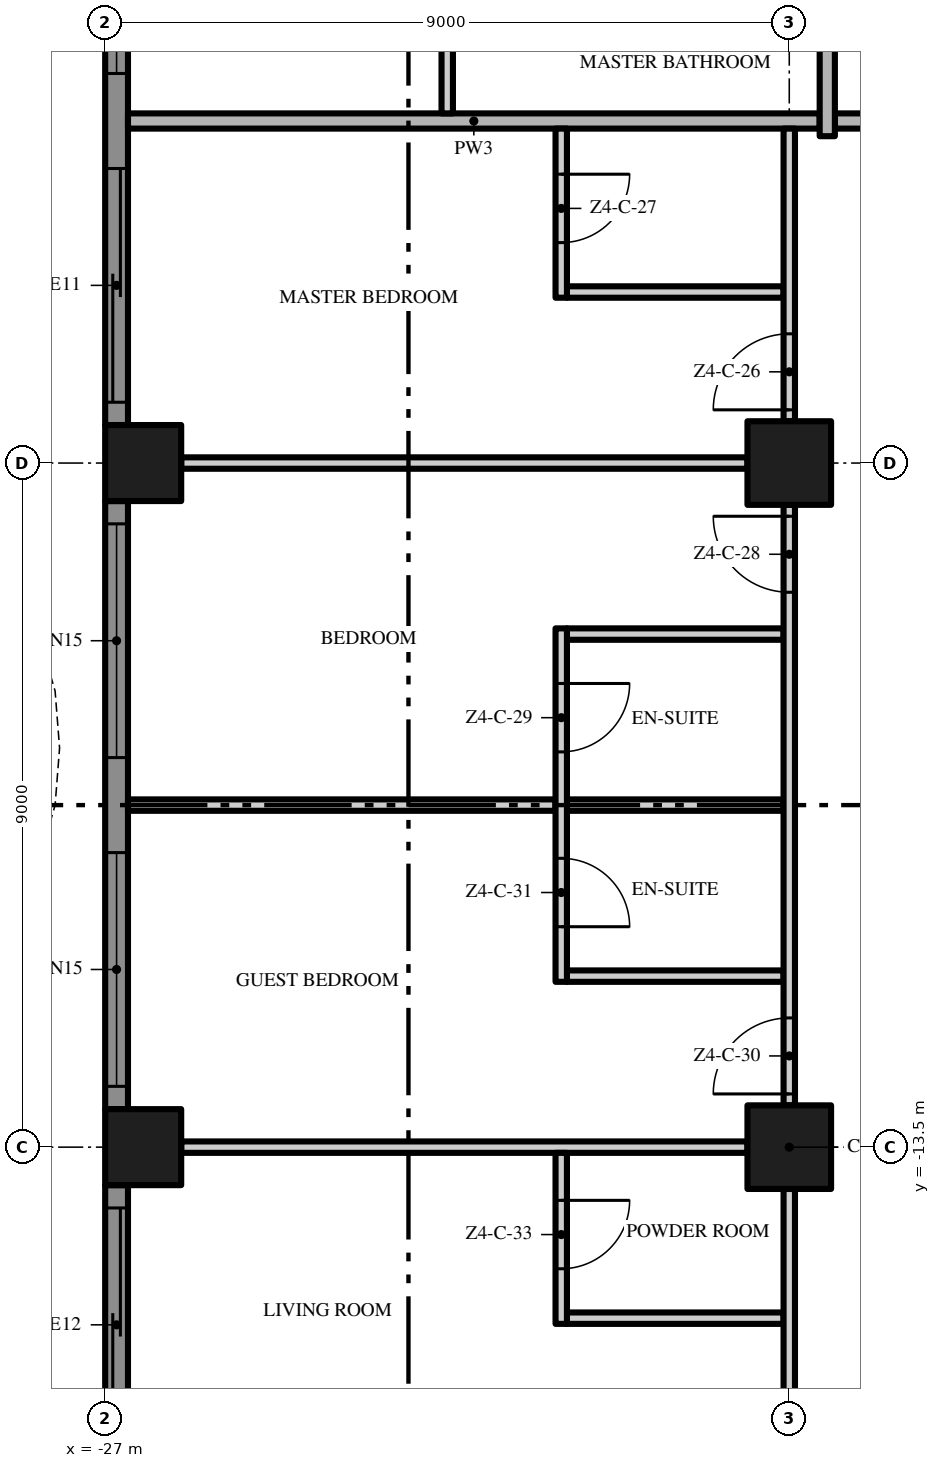
"""IFC4 building model, lengths in metres.
Left out: names, types, materials, properties, quantities, classifications, styles, units other than length and angle.
Written with IfcOpenShell. Run it as: python <this file> out.ifc"""

import sys

from ifc_helpers import new_model, si_unit, direction, frame, frame_2d, origin, origin_2d, place, context, subcontext, project, spatial, polyline, rectangle, outline, extrude, element, fill, save


model = new_model("IFC4")
c1 = context("Model", 3, precision=1e-05, world=origin(), true_north=direction((0.0, 1.0)))
c2 = subcontext(c1, "Body", "Model", "MODEL_VIEW")
j1 = project(units=[si_unit("LENGTHUNIT", "METRE"), si_unit("PLANEANGLEUNIT", "RADIAN")], contexts=[c1])
p1 = place(None, origin())
s1 = spatial("IfcSite", under=j1, at=p1, CompositionType="ELEMENT")
p2 = place(p1, origin())
s2 = spatial("IfcBuilding", under=s1, at=p2, CompositionType="ELEMENT")
p3 = place(p2, frame((0.0, 0.0, 211.0)))
s3 = spatial("IfcBuildingStorey", under=s2, at=p3, CompositionType="ELEMENT", Elevation=211.0)
for number, where, z_axis, x_axis in (
    (1, (-18.0, -13.5, 0.0), (0.0, 0.0, 1.0), (1.0, 0.0, 0.0)),
    (2, (-18.0, -4.5, 0.0), (0.0, 0.0, 1.0), (1.0, 0.0, 0.0)),
):
    element("IfcColumn", number, at=place(p3, frame(where, z_axis=z_axis, x_axis=x_axis)), inside=s3, PredefinedType="COLUMN", context=c2, shape_type="SweptSolid", body=[
        extrude(rectangle(XDim=1.1, YDim=1.1, at=origin_2d()), origin(), (0.0, 0.0, 1.0), 3.5),
    ])
for number, where, z_axis, x_axis in (
    (3, (-26.5, -13.5, 0.0), (0.0, 0.0, 1.0), (1.0, 0.0, 0.0)),
    (4, (-26.5, -4.5, 0.0), (0.0, 0.0, 1.0), (1.0, 0.0, 0.0)),
):
    element("IfcColumn", number, at=place(p3, frame(where, z_axis=z_axis, x_axis=x_axis)), inside=s3, PredefinedType="COLUMN", context=c2, shape_type="SweptSolid", body=[
        extrude(rectangle(XDim=1.0, YDim=1.0, at=origin_2d()), origin(), (0.0, 0.0, 1.0), 3.5),
    ])
p4 = place(p3, frame((-26.85, -4.0, 0.0), z_axis=(0.0, 0.0, 1.0), x_axis=(0.0, 1.0, 0.0)))
e5 = element("IfcWall", 5, at=p4, inside=s3, PredefinedType="SOLIDWALL", context=c2, shape_type="SweptSolid", body=[
    extrude(rectangle(XDim=8.0, YDim=0.3, at=frame_2d((4.0, 0.0))), origin(), (0.0, 0.0, 1.0), 3.5),
])
p5 = place(p4, frame((4.625, 0.0, 0.45)))
e6 = element("IfcOpeningElement", 6, at=p5, cuts=e5, PredefinedType="OPENING", context=c2, shape_type="SweptSolid", body=[
    extrude(rectangle(XDim=3.075, YDim=2.65, at=frame_2d((1.538, 1.325))), frame((0.0, 0.16, 0.0), z_axis=(0.0, -1.0, 0.0), x_axis=(1.0, 0.0, 0.0)), (0.0, 0.0, 1.0), 0.32),
])
p6 = place(p4, frame((0.3, 0.0, 0.0)))
e7 = element("IfcOpeningElement", 7, at=p6, cuts=e5, PredefinedType="OPENING", context=c2, shape_type="SweptSolid", body=[
    extrude(rectangle(XDim=3.075, YDim=2.4, at=frame_2d((1.538, 1.2))), frame((0.0, 0.16, 0.0), z_axis=(0.0, -1.0, 0.0), x_axis=(1.0, 0.0, 0.0)), (0.0, 0.0, 1.0), 0.32),
])
p7 = place(p3, frame((-26.85, -13.0, 0.0), z_axis=(0.0, 0.0, 1.0), x_axis=(0.0, 1.0, 0.0)))
e8 = element("IfcWall", 8, at=p7, inside=s3, PredefinedType="SOLIDWALL", context=c2, shape_type="SweptSolid", body=[
    extrude(rectangle(XDim=8.0, YDim=0.3, at=frame_2d((4.0, 0.0))), origin(), (0.0, 0.0, 1.0), 3.5),
])
p8 = place(p7, frame((4.625, 0.0, 0.45)))
e9 = element("IfcOpeningElement", 9, at=p8, cuts=e8, PredefinedType="OPENING", context=c2, shape_type="SweptSolid", body=[
    extrude(rectangle(XDim=3.075, YDim=2.65, at=frame_2d((1.538, 1.325))), frame((0.0, 0.16, 0.0), z_axis=(0.0, -1.0, 0.0), x_axis=(1.0, 0.0, 0.0)), (0.0, 0.0, 1.0), 0.32),
])
p9 = place(p7, frame((0.3, 0.0, 0.45)))
e10 = element("IfcOpeningElement", 10, at=p9, cuts=e8, PredefinedType="OPENING", context=c2, shape_type="SweptSolid", body=[
    extrude(rectangle(XDim=3.075, YDim=2.65, at=frame_2d((1.538, 1.325))), frame((0.0, 0.16, 0.0), z_axis=(0.0, -1.0, 0.0), x_axis=(1.0, 0.0, 0.0)), (0.0, 0.0, 1.0), 0.32),
])
p10 = place(p3, frame((-26.85, -18.0, 0.0), z_axis=(0.0, 0.0, 1.0), x_axis=(0.0, 1.0, 0.0)))
e11 = element("IfcWall", 11, at=p10, inside=s3, PredefinedType="SOLIDWALL", context=c2, shape_type="SweptSolid", body=[
    extrude(rectangle(XDim=4.0, YDim=0.3, at=frame_2d((2.0, 0.0))), origin(), (0.0, 0.0, 1.0), 3.5),
])
p11 = place(p10, frame((0.625, 0.0, 0.0)))
e12 = element("IfcOpeningElement", 12, at=p11, cuts=e11, PredefinedType="OPENING", context=c2, shape_type="SweptSolid", body=[
    extrude(rectangle(XDim=3.075, YDim=2.4, at=frame_2d((1.538, 1.2))), frame((0.0, 0.16, 0.0), z_axis=(0.0, -1.0, 0.0), x_axis=(1.0, 0.0, 0.0)), (0.0, 0.0, 1.0), 0.32),
])
p12 = place(p3, origin())
e13 = element("IfcWall", 13, at=p12, inside=s3, PredefinedType="USERDEFINED", context=c2, shape_type="SweptSolid", body=[
    extrude(outline(polyline([(-28.8, 18.0), (-29.505, 16.5), (-29.941, 15.0), (-30.0, 14.25), (-29.941, 13.5), (-29.505, 12.0), (-28.8, 10.5), (-28.095, 9.0), (-27.659, 7.5), (-27.6, 6.75), (-27.659, 6.0), (-28.095, 4.5), (-28.8, 3.0), (-29.505, 1.5), (-29.941, 0.0), (-30.0, -0.75), (-29.941, -1.5), (-29.505, -3.0), (-28.8, -4.5), (-28.095, -6.0), (-27.659, -7.5), (-27.6, -8.25), (-27.659, -9.0), (-28.095, -10.5), (-28.8, -12.0), (-29.505, -13.5), (-29.941, -15.0), (-30.0, -15.75), (-29.941, -16.5), (-29.505, -18.0), (-29.265, -17.93), (-29.694, -16.455), (-29.749, -15.75), (-29.694, -15.045), (-29.271, -13.589), (-28.574, -12.106), (-27.86, -10.589), (-27.411, -9.045), (-27.349, -8.25), (-27.411, -7.455), (-27.86, -5.911), (-28.574, -4.394), (-29.271, -2.911), (-29.694, -1.455), (-29.749, -0.75), (-29.694, -0.045), (-29.271, 1.411), (-28.574, 2.894), (-27.86, 4.411), (-27.411, 5.955), (-27.349, 6.75), (-27.411, 7.545), (-27.86, 9.089), (-28.574, 10.606), (-29.271, 12.089), (-29.694, 13.545), (-29.749, 14.25), (-29.694, 14.955), (-29.271, 16.411), (-28.574, 17.894), (-28.8, 18.0)])), origin(), (0.0, 0.0, 1.0), 0.9),
])
p13 = place(p3, frame((-20.925, -15.75, 0.0), z_axis=(0.0, 0.0, 1.0), x_axis=(1.0, 0.0, 0.0)))
e14 = element("IfcWall", 14, at=p13, inside=s3, PredefinedType="PARTITIONING", context=c2, shape_type="SweptSolid", body=[
    extrude(rectangle(XDim=2.85, YDim=0.15, at=frame_2d((1.425, 0.0))), origin(), (0.0, 0.0, 1.0), 3.5),
])
p14 = place(p3, frame((-26.0, -13.5, 0.0), z_axis=(0.0, 0.0, 1.0), x_axis=(1.0, 0.0, 0.0)))
e15 = element("IfcWall", 15, at=p14, inside=s3, PredefinedType="PARTITIONING", context=c2, shape_type="SweptSolid", body=[
    extrude(rectangle(XDim=7.45, YDim=0.15, at=frame_2d((3.725, 0.0))), origin(), (0.0, 0.0, 1.0), 3.5),
])
p15 = place(p3, frame((-20.925, -11.25, 0.0), z_axis=(0.0, 0.0, 1.0), x_axis=(1.0, 0.0, 0.0)))
e16 = element("IfcWall", 16, at=p15, inside=s3, PredefinedType="PARTITIONING", context=c2, shape_type="SweptSolid", body=[
    extrude(rectangle(XDim=2.85, YDim=0.15, at=frame_2d((1.425, 0.0))), origin(), (0.0, 0.0, 1.0), 3.5),
])
p16 = place(p3, frame((-26.7, -9.0, 0.0), z_axis=(0.0, 0.0, 1.0), x_axis=(1.0, 0.0, 0.0)))
e17 = element("IfcWall", 17, at=p16, inside=s3, PredefinedType="PARTITIONING", context=c2, shape_type="SweptSolid", body=[
    extrude(rectangle(XDim=5.625, YDim=0.15, at=frame_2d((2.812, 0.0))), origin(), (0.0, 0.0, 1.0), 3.5),
])
for number, where, z_axis, x_axis in (
    (18, (-20.925, -9.0, 0.0), (0.0, 0.0, 1.0), (1.0, 0.0, 0.0)),
    (19, (-20.925, -6.75, 0.0), (0.0, 0.0, 1.0), (1.0, 0.0, 0.0)),
):
    element("IfcWall", number, at=place(p3, frame(where, z_axis=z_axis, x_axis=x_axis)), inside=s3, PredefinedType="PARTITIONING", context=c2, shape_type="SweptSolid", body=[
        extrude(rectangle(XDim=2.85, YDim=0.15, at=frame_2d((1.425, 0.0))), origin(), (0.0, 0.0, 1.0), 3.5),
    ])
p17 = place(p3, frame((-26.0, -4.5, 0.0), z_axis=(0.0, 0.0, 1.0), x_axis=(1.0, 0.0, 0.0)))
e20 = element("IfcWall", 20, at=p17, inside=s3, PredefinedType="PARTITIONING", context=c2, shape_type="SweptSolid", body=[
    extrude(rectangle(XDim=7.45, YDim=0.15, at=frame_2d((3.725, 0.0))), origin(), (0.0, 0.0, 1.0), 3.5),
])
p18 = place(p3, frame((-20.925, -2.25, 0.0), z_axis=(0.0, 0.0, 1.0), x_axis=(1.0, 0.0, 0.0)))
e21 = element("IfcWall", 21, at=p18, inside=s3, PredefinedType="PARTITIONING", context=c2, shape_type="SweptSolid", body=[
    extrude(rectangle(XDim=2.85, YDim=0.15, at=frame_2d((1.425, 0.0))), origin(), (0.0, 0.0, 1.0), 3.5),
])
p19 = place(p3, frame((-17.4, 0.0, 0.0), z_axis=(0.0, 0.0, 1.0), x_axis=(1.0, 0.0, 0.0)))
e22 = element("IfcWall", 22, at=p19, inside=s3, PredefinedType="PARTITIONING", context=c2, shape_type="SweptSolid", body=[
    extrude(rectangle(XDim=12.8, YDim=0.2, at=frame_2d((6.4, 0.0))), origin(), (0.0, 0.0, 1.0), 3.5),
])
p20 = place(p3, frame((-26.7, 0.0, 0.0), z_axis=(0.0, 0.0, 1.0), x_axis=(1.0, 0.0, 0.0)))
e23 = element("IfcWall", 23, at=p20, inside=s3, PredefinedType="PARTITIONING", context=c2, shape_type="SweptSolid", body=[
    extrude(rectangle(XDim=9.1, YDim=0.2, at=frame_2d((4.55, 0.0))), origin(), (0.0, 0.0, 1.0), 3.5),
])
p21 = place(p3, frame((-22.5, 0.1, 0.0), z_axis=(0.0, 0.0, 1.0), x_axis=(0.0, 1.0, 0.0)))
e24 = element("IfcWall", 24, at=p21, inside=s3, PredefinedType="PARTITIONING", context=c2, shape_type="SweptSolid", body=[
    extrude(rectangle(XDim=17.4, YDim=0.15, at=frame_2d((8.7, 0.0))), origin(), (0.0, 0.0, 1.0), 3.5),
])
p22 = place(p21, frame((1.65, 0.0, 0.0)))
e25 = element("IfcOpeningElement", 25, at=p22, cuts=e24, PredefinedType="OPENING", context=c2, shape_type="SweptSolid", body=[
    extrude(rectangle(XDim=1.0, YDim=2.4, at=frame_2d((0.5, 1.2))), frame((0.0, 0.085, 0.0), z_axis=(0.0, -1.0, 0.0), x_axis=(1.0, 0.0, 0.0)), (0.0, 0.0, 1.0), 0.17),
])
p23 = place(p21, frame((7.25, 0.0, 0.0)))
e26 = element("IfcOpeningElement", 26, at=p23, cuts=e24, PredefinedType="OPENING", context=c2, shape_type="SweptSolid", body=[
    extrude(rectangle(XDim=1.0, YDim=2.4, at=frame_2d((0.5, 1.2))), frame((0.0, 0.085, 0.0), z_axis=(0.0, -1.0, 0.0), x_axis=(1.0, 0.0, 0.0)), (0.0, 0.0, 1.0), 0.17),
])
p24 = place(p21, frame((9.5, 0.0, 0.0)))
e27 = element("IfcOpeningElement", 27, at=p24, cuts=e24, PredefinedType="OPENING", context=c2, shape_type="SweptSolid", body=[
    extrude(rectangle(XDim=1.0, YDim=2.4, at=frame_2d((0.5, 1.2))), frame((0.0, 0.085, 0.0), z_axis=(0.0, -1.0, 0.0), x_axis=(1.0, 0.0, 0.0)), (0.0, 0.0, 1.0), 0.17),
])
p25 = place(p21, frame((16.25, 0.0, 0.0)))
e28 = element("IfcOpeningElement", 28, at=p25, cuts=e24, PredefinedType="OPENING", context=c2, shape_type="SweptSolid", body=[
    extrude(rectangle(XDim=1.0, YDim=2.4, at=frame_2d((0.5, 1.2))), frame((0.0, 0.085, 0.0), z_axis=(0.0, -1.0, 0.0), x_axis=(1.0, 0.0, 0.0)), (0.0, 0.0, 1.0), 0.17),
])
p26 = place(p3, frame((-21.0, -13.575, 0.0), z_axis=(0.0, 0.0, 1.0), x_axis=(0.0, -1.0, 0.0)))
e29 = element("IfcWall", 29, at=p26, inside=s3, PredefinedType="PARTITIONING", context=c2, shape_type="SweptSolid", body=[
    extrude(rectangle(XDim=2.25, YDim=0.15, at=frame_2d((1.125, 0.0))), origin(), (0.0, 0.0, 1.0), 3.5),
])
p27 = place(p26, frame((0.625, 0.0, 0.0)))
e30 = element("IfcOpeningElement", 30, at=p27, cuts=e29, PredefinedType="OPENING", context=c2, shape_type="SweptSolid", body=[
    extrude(rectangle(XDim=0.9, YDim=2.1, at=frame_2d((0.45, 1.05))), frame((0.0, 0.085, 0.0), z_axis=(0.0, -1.0, 0.0), x_axis=(1.0, 0.0, 0.0)), (0.0, 0.0, 1.0), 0.17),
])
p28 = place(p3, frame((-21.0, -6.675, 0.0), z_axis=(0.0, 0.0, 1.0), x_axis=(0.0, -1.0, 0.0)))
e31 = element("IfcWall", 31, at=p28, inside=s3, PredefinedType="PARTITIONING", context=c2, shape_type="SweptSolid", body=[
    extrude(rectangle(XDim=4.65, YDim=0.15, at=frame_2d((2.325, 0.0))), origin(), (0.0, 0.0, 1.0), 3.5),
])
p29 = place(p28, frame((0.725, 0.0, 0.0)))
e32 = element("IfcOpeningElement", 32, at=p29, cuts=e31, PredefinedType="OPENING", context=c2, shape_type="SweptSolid", body=[
    extrude(rectangle(XDim=0.9, YDim=2.1, at=frame_2d((0.45, 1.05))), frame((0.0, 0.085, 0.0), z_axis=(0.0, -1.0, 0.0), x_axis=(1.0, 0.0, 0.0)), (0.0, 0.0, 1.0), 0.17),
])
p30 = place(p28, frame((3.025, 0.0, 0.0)))
e33 = element("IfcOpeningElement", 33, at=p30, cuts=e31, PredefinedType="OPENING", context=c2, shape_type="SweptSolid", body=[
    extrude(rectangle(XDim=0.9, YDim=2.1, at=frame_2d((0.45, 1.05))), frame((0.0, 0.085, 0.0), z_axis=(0.0, -1.0, 0.0), x_axis=(1.0, 0.0, 0.0)), (0.0, 0.0, 1.0), 0.17),
])
p31 = place(p3, frame((-21.0, -0.1, 0.0), z_axis=(0.0, 0.0, 1.0), x_axis=(0.0, -1.0, 0.0)))
e34 = element("IfcWall", 34, at=p31, inside=s3, PredefinedType="PARTITIONING", context=c2, shape_type="SweptSolid", body=[
    extrude(rectangle(XDim=2.225, YDim=0.15, at=frame_2d((1.113, 0.0))), origin(), (0.0, 0.0, 1.0), 3.5),
])
p32 = place(p31, frame((0.6, 0.0, 0.0)))
e35 = element("IfcOpeningElement", 35, at=p32, cuts=e34, PredefinedType="OPENING", context=c2, shape_type="SweptSolid", body=[
    extrude(rectangle(XDim=0.9, YDim=2.1, at=frame_2d((0.45, 1.05))), frame((0.0, 0.085, 0.0), z_axis=(0.0, -1.0, 0.0), x_axis=(1.0, 0.0, 0.0)), (0.0, 0.0, 1.0), 0.17),
])
p33 = place(p3, frame((-18.0, -21.5, 0.0), z_axis=(0.0, 0.0, 1.0), x_axis=(0.0, 1.0, 0.0)))
e36 = element("IfcWall", 36, at=p33, inside=s3, PredefinedType="PARTITIONING", context=c2, shape_type="SweptSolid", body=[
    extrude(rectangle(XDim=7.45, YDim=0.15, at=frame_2d((3.725, 0.0))), origin(), (0.0, 0.0, 1.0), 3.5),
])
p34 = place(p33, frame((1.45, 0.0, 0.0)))
e37 = element("IfcOpeningElement", 37, at=p34, cuts=e36, PredefinedType="OPENING", context=c2, shape_type="SweptSolid", body=[
    extrude(rectangle(XDim=1.8, YDim=2.4, at=frame_2d((0.9, 1.2))), frame((0.0, 0.085, 0.0), z_axis=(0.0, -1.0, 0.0), x_axis=(1.0, 0.0, 0.0)), (0.0, 0.0, 1.0), 0.17),
])
p35 = place(p3, frame((-18.0, -12.95, 0.0), z_axis=(0.0, 0.0, 1.0), x_axis=(0.0, 1.0, 0.0)))
e38 = element("IfcWall", 38, at=p35, inside=s3, PredefinedType="PARTITIONING", context=c2, shape_type="SweptSolid", body=[
    extrude(rectangle(XDim=7.9, YDim=0.15, at=frame_2d((3.95, 0.0))), origin(), (0.0, 0.0, 1.0), 3.5),
])
p36 = place(p35, frame((6.75, 0.0, 0.0)))
e39 = element("IfcOpeningElement", 39, at=p36, cuts=e38, PredefinedType="OPENING", context=c2, shape_type="SweptSolid", body=[
    extrude(rectangle(XDim=1.0, YDim=2.4, at=frame_2d((0.5, 1.2))), frame((0.0, 0.085, 0.0), z_axis=(0.0, -1.0, 0.0), x_axis=(1.0, 0.0, 0.0)), (0.0, 0.0, 1.0), 0.17),
])
p37 = place(p35, frame((0.15, 0.0, 0.0)))
e40 = element("IfcOpeningElement", 40, at=p37, cuts=e38, PredefinedType="OPENING", context=c2, shape_type="SweptSolid", body=[
    extrude(rectangle(XDim=1.0, YDim=2.4, at=frame_2d((0.5, 1.2))), frame((0.0, 0.085, 0.0), z_axis=(0.0, -1.0, 0.0), x_axis=(1.0, 0.0, 0.0)), (0.0, 0.0, 1.0), 0.17),
])
p38 = place(p3, frame((-18.0, -3.95, 0.0), z_axis=(0.0, 0.0, 1.0), x_axis=(0.0, 1.0, 0.0)))
e41 = element("IfcWall", 41, at=p38, inside=s3, PredefinedType="PARTITIONING", context=c2, shape_type="SweptSolid", body=[
    extrude(rectangle(XDim=3.85, YDim=0.15, at=frame_2d((1.925, 0.0))), origin(), (0.0, 0.0, 1.0), 3.5),
])
p39 = place(p38, frame((0.15, 0.0, 0.0)))
e42 = element("IfcOpeningElement", 42, at=p39, cuts=e41, PredefinedType="OPENING", context=c2, shape_type="SweptSolid", body=[
    extrude(rectangle(XDim=1.0, YDim=2.4, at=frame_2d((0.5, 1.2))), frame((0.0, 0.085, 0.0), z_axis=(0.0, -1.0, 0.0), x_axis=(1.0, 0.0, 0.0)), (0.0, 0.0, 1.0), 0.17),
])
p40 = place(p3, frame((-17.5, -0.2, 0.0), z_axis=(0.0, 0.0, 1.0), x_axis=(0.0, 1.0, 0.0)))
e43 = element("IfcWall", 43, at=p40, inside=s3, PredefinedType="PARTITIONING", context=c2, shape_type="SweptSolid", body=[
    extrude(rectangle(XDim=4.15, YDim=0.2, at=frame_2d((2.075, 0.0))), origin(), (0.0, 0.0, 1.0), 3.5),
])
p41 = place(p5, origin())
e44 = element("IfcWindow", 44, at=p41, inside=s3, PartitioningType="SINGLE_PANEL", PredefinedType="WINDOW", context=c2, shape_type="SweptSolid", body=[
    extrude(rectangle(XDim=3.075, YDim=2.65, at=frame_2d((1.538, 1.325))), frame((0.0, 0.03, 0.0), z_axis=(0.0, -1.0, 0.0), x_axis=(1.0, 0.0, 0.0)), (0.0, 0.0, 1.0), 0.06),
])
fill(e6, e44)
p42 = place(p6, origin())
e45 = element("IfcDoor", 45, at=p42, inside=s3, OperationType="SINGLE_SWING_LEFT", PredefinedType="DOOR", context=c2, shape_type="SweptSolid", body=[
    extrude(rectangle(XDim=3.075, YDim=2.4, at=frame_2d((1.538, 1.2))), frame((0.0, 0.025, 0.0), z_axis=(0.0, -1.0, 0.0), x_axis=(1.0, 0.0, 0.0)), (0.0, 0.0, 1.0), 0.05),
])
fill(e7, e45)
p43 = place(p8, origin())
e46 = element("IfcWindow", 46, at=p43, inside=s3, PartitioningType="SINGLE_PANEL", PredefinedType="WINDOW", context=c2, shape_type="SweptSolid", body=[
    extrude(rectangle(XDim=3.075, YDim=2.65, at=frame_2d((1.538, 1.325))), frame((0.0, 0.03, 0.0), z_axis=(0.0, -1.0, 0.0), x_axis=(1.0, 0.0, 0.0)), (0.0, 0.0, 1.0), 0.06),
])
fill(e9, e46)
p44 = place(p9, origin())
e47 = element("IfcWindow", 47, at=p44, inside=s3, PartitioningType="SINGLE_PANEL", PredefinedType="WINDOW", context=c2, shape_type="SweptSolid", body=[
    extrude(rectangle(XDim=3.075, YDim=2.65, at=frame_2d((1.538, 1.325))), frame((0.0, 0.03, 0.0), z_axis=(0.0, -1.0, 0.0), x_axis=(1.0, 0.0, 0.0)), (0.0, 0.0, 1.0), 0.06),
])
fill(e10, e47)
p45 = place(p11, origin())
e48 = element("IfcDoor", 48, at=p45, inside=s3, OperationType="SINGLE_SWING_LEFT", PredefinedType="DOOR", context=c2, shape_type="SweptSolid", body=[
    extrude(rectangle(XDim=3.075, YDim=2.4, at=frame_2d((1.538, 1.2))), frame((0.0, 0.025, 0.0), z_axis=(0.0, -1.0, 0.0), x_axis=(1.0, 0.0, 0.0)), (0.0, 0.0, 1.0), 0.05),
])
fill(e12, e48)
p46 = place(p39, origin())
e49 = element("IfcDoor", 49, at=p46, inside=s3, OperationType="SINGLE_SWING_LEFT", PredefinedType="DOOR", context=c2, shape_type="SweptSolid", body=[
    extrude(rectangle(XDim=1.0, YDim=2.4, at=frame_2d((0.5, 1.2))), frame((0.0, 0.025, 0.0), z_axis=(0.0, -1.0, 0.0), x_axis=(1.0, 0.0, 0.0)), (0.0, 0.0, 1.0), 0.05),
])
fill(e42, e49)
p47 = place(p32, origin())
e50 = element("IfcDoor", 50, at=p47, inside=s3, OperationType="SINGLE_SWING_LEFT", PredefinedType="DOOR", context=c2, shape_type="SweptSolid", body=[
    extrude(rectangle(XDim=0.9, YDim=2.1, at=frame_2d((0.45, 1.05))), frame((0.0, 0.025, 0.0), z_axis=(0.0, -1.0, 0.0), x_axis=(1.0, 0.0, 0.0)), (0.0, 0.0, 1.0), 0.05),
])
fill(e35, e50)
p48 = place(p36, origin())
e51 = element("IfcDoor", 51, at=p48, inside=s3, OperationType="SINGLE_SWING_RIGHT", PredefinedType="DOOR", context=c2, shape_type="SweptSolid", body=[
    extrude(rectangle(XDim=1.0, YDim=2.4, at=frame_2d((0.5, 1.2))), frame((0.0, 0.025, 0.0), z_axis=(0.0, -1.0, 0.0), x_axis=(1.0, 0.0, 0.0)), (0.0, 0.0, 1.0), 0.05),
])
fill(e39, e51)
p49 = place(p29, origin())
e52 = element("IfcDoor", 52, at=p49, inside=s3, OperationType="SINGLE_SWING_LEFT", PredefinedType="DOOR", context=c2, shape_type="SweptSolid", body=[
    extrude(rectangle(XDim=0.9, YDim=2.1, at=frame_2d((0.45, 1.05))), frame((0.0, 0.025, 0.0), z_axis=(0.0, -1.0, 0.0), x_axis=(1.0, 0.0, 0.0)), (0.0, 0.0, 1.0), 0.05),
])
fill(e32, e52)
p50 = place(p37, origin())
e53 = element("IfcDoor", 53, at=p50, inside=s3, OperationType="SINGLE_SWING_LEFT", PredefinedType="DOOR", context=c2, shape_type="SweptSolid", body=[
    extrude(rectangle(XDim=1.0, YDim=2.4, at=frame_2d((0.5, 1.2))), frame((0.0, 0.025, 0.0), z_axis=(0.0, -1.0, 0.0), x_axis=(1.0, 0.0, 0.0)), (0.0, 0.0, 1.0), 0.05),
])
fill(e40, e53)
p51 = place(p30, origin())
e54 = element("IfcDoor", 54, at=p51, inside=s3, OperationType="SINGLE_SWING_RIGHT", PredefinedType="DOOR", context=c2, shape_type="SweptSolid", body=[
    extrude(rectangle(XDim=0.9, YDim=2.1, at=frame_2d((0.45, 1.05))), frame((0.0, 0.025, 0.0), z_axis=(0.0, -1.0, 0.0), x_axis=(1.0, 0.0, 0.0)), (0.0, 0.0, 1.0), 0.05),
])
fill(e33, e54)
p52 = place(p27, origin())
e55 = element("IfcDoor", 55, at=p52, inside=s3, OperationType="SINGLE_SWING_LEFT", PredefinedType="DOOR", context=c2, shape_type="SweptSolid", body=[
    extrude(rectangle(XDim=0.9, YDim=2.1, at=frame_2d((0.45, 1.05))), frame((0.0, 0.025, 0.0), z_axis=(0.0, -1.0, 0.0), x_axis=(1.0, 0.0, 0.0)), (0.0, 0.0, 1.0), 0.05),
])
fill(e30, e55)
save(model, sys.argv[1])
